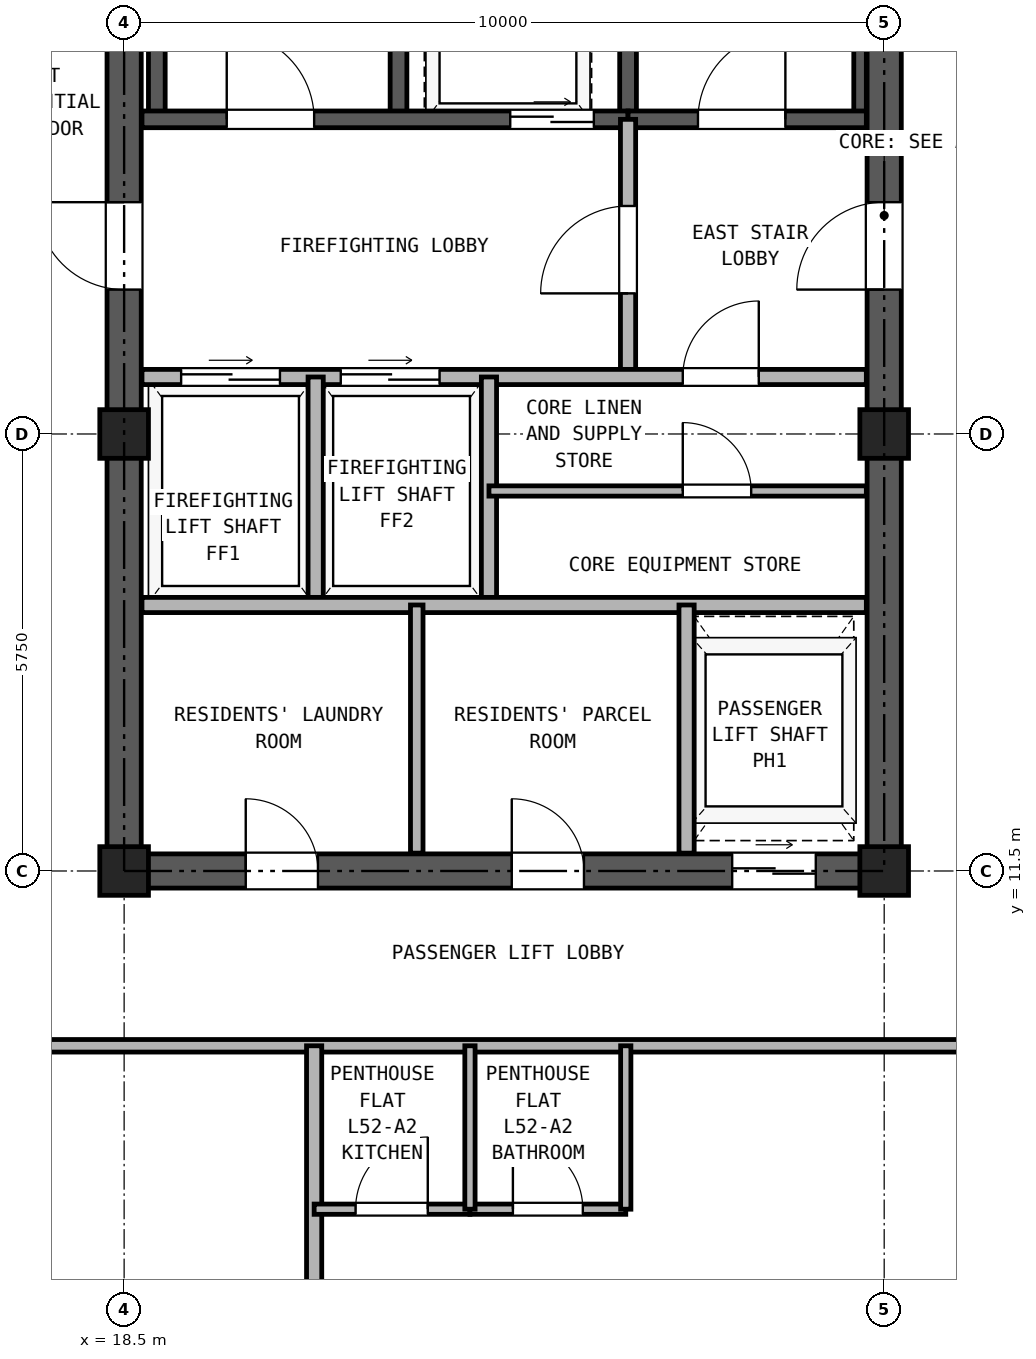
"""IFC4 building model, lengths in metres.
Left out: names, types, materials, properties, quantities, classifications, styles, units other than length and angle.
Written with IfcOpenShell. Run it as: python <this file> out.ifc"""

import sys

from ifc_helpers import new_model, si_unit, direction, frame, frame_2d, origin, origin_2d, place, context, subcontext, project, spatial, rectangle, hollow_rectangle, extrude, source, transform, mapped, element, fill, save


model = new_model("IFC4")
c1 = context("Model", 3, precision=1e-05, world=origin(), true_north=direction((0.0, 1.0)))
c2 = subcontext(c1, "Body", "Model", "MODEL_VIEW")
j1 = project(units=[si_unit("LENGTHUNIT", "METRE"), si_unit("PLANEANGLEUNIT", "RADIAN")], contexts=[c1])
p1 = place(None, origin())
s1 = spatial("IfcSite", under=j1, at=p1, CompositionType="ELEMENT")
p2 = place(p1, origin())
s2 = spatial("IfcBuilding", under=s1, at=p2, CompositionType="ELEMENT")
p3 = place(p2, frame((0.0, 0.0, 184.9)))
s3 = spatial("IfcBuildingStorey", under=s2, at=p3, CompositionType="ELEMENT", Elevation=184.9)
m1 = source(origin(), c2, "Body", "SweptSolid", [
    extrude(hollow_rectangle(XDim=0.64, YDim=0.64, WallThickness=0.035, at=origin_2d()), origin(), (0.0, 0.0, 1.0), 2.84),
])
for number, where, z_axis, x_axis in (
    (1, (18.5, 11.5, 0.0), (0.0, 0.0, 1.0), (1.0, 0.0, 0.0)),
    (2, (18.5, 17.25, 0.0), (0.0, 0.0, 1.0), (1.0, 0.0, 0.0)),
    (3, (28.5, 11.5, 0.0), (0.0, 0.0, 1.0), (1.0, 0.0, 0.0)),
    (4, (28.5, 17.25, 0.0), (0.0, 0.0, 1.0), (1.0, 0.0, 0.0)),
):
    element("IfcColumn", number, at=place(p3, frame(where, z_axis=z_axis, x_axis=x_axis)), inside=s3, PredefinedType="COLUMN", context=c2, shape_type="MappedRepresentation", body=[
        mapped(m1, transform((0.0, 0.0, 0.0), x_axis=(1.0, 0.0, 0.0), y_axis=(0.0, 1.0, 0.0), z_axis=(0.0, 0.0, 1.0), scale=1.0)),
    ])
p4 = place(p3, frame((18.275, 11.5, 0.0), z_axis=(0.0, 0.0, 1.0), x_axis=(1.0, 0.0, 0.0)))
e5 = element("IfcWall", 5, at=p4, inside=s3, PredefinedType="SHEAR", context=c2, shape_type="SweptSolid", body=[
    extrude(rectangle(XDim=10.45, YDim=0.45, at=frame_2d((5.225, 0.0))), origin(), (0.0, 0.0, 1.0), 2.84),
])
p5 = place(p4, frame((1.825, 0.0, 0.0)))
e6 = element("IfcOpeningElement", 6, at=p5, cuts=e5, PredefinedType="OPENING", context=c2, shape_type="SweptSolid", body=[
    extrude(rectangle(XDim=0.95, YDim=2.15, at=frame_2d((0.475, 1.075))), frame((0.0, 0.235, 0.0), z_axis=(0.0, -1.0, 0.0), x_axis=(1.0, 0.0, 0.0)), (0.0, 0.0, 1.0), 0.47),
])
p6 = place(p4, frame((5.325, 0.0, 0.0)))
e7 = element("IfcOpeningElement", 7, at=p6, cuts=e5, PredefinedType="OPENING", context=c2, shape_type="SweptSolid", body=[
    extrude(rectangle(XDim=0.95, YDim=2.15, at=frame_2d((0.475, 1.075))), frame((0.0, 0.235, 0.0), z_axis=(0.0, -1.0, 0.0), x_axis=(1.0, 0.0, 0.0)), (0.0, 0.0, 1.0), 0.47),
])
p7 = place(p4, frame((8.225, 0.0, 0.0)))
e8 = element("IfcOpeningElement", 8, at=p7, cuts=e5, PredefinedType="OPENING", context=c2, shape_type="SweptSolid", body=[
    extrude(rectangle(XDim=1.1, YDim=2.25, at=frame_2d((0.55, 1.125))), frame((0.0, 0.235, 0.0), z_axis=(0.0, -1.0, 0.0), x_axis=(1.0, 0.0, 0.0)), (0.0, 0.0, 1.0), 0.47),
])
p8 = place(p3, frame((18.5, 11.725, 0.0), z_axis=(0.0, 0.0, 1.0), x_axis=(0.0, 1.0, 0.0)))
e9 = element("IfcWall", 9, at=p8, inside=s3, PredefinedType="SHEAR", context=c2, shape_type="SweptSolid", body=[
    extrude(rectangle(XDim=16.8, YDim=0.45, at=frame_2d((8.4, 0.0))), origin(), (0.0, 0.0, 1.0), 2.84),
])
p9 = place(p8, frame((7.425, 0.0, 0.0)))
e10 = element("IfcOpeningElement", 10, at=p9, cuts=e9, PredefinedType="OPENING", context=c2, shape_type="SweptSolid", body=[
    extrude(rectangle(XDim=1.15, YDim=2.2, at=frame_2d((0.575, 1.1))), frame((0.0, 0.235, 0.0), z_axis=(0.0, -1.0, 0.0), x_axis=(1.0, 0.0, 0.0)), (0.0, 0.0, 1.0), 0.47),
])
p10 = place(p3, frame((28.5, 11.725, 0.0), z_axis=(0.0, 0.0, 1.0), x_axis=(0.0, 1.0, 0.0)))
e11 = element("IfcWall", 11, at=p10, inside=s3, PredefinedType="SHEAR", context=c2, shape_type="SweptSolid", body=[
    extrude(rectangle(XDim=16.8, YDim=0.45, at=frame_2d((8.4, 0.0))), origin(), (0.0, 0.0, 1.0), 2.84),
])
p11 = place(p10, frame((7.425, 0.0, 0.0)))
e12 = element("IfcOpeningElement", 12, at=p11, cuts=e11, PredefinedType="OPENING", context=c2, shape_type="SweptSolid", body=[
    extrude(rectangle(XDim=1.15, YDim=2.2, at=frame_2d((0.575, 1.1))), frame((0.0, 0.235, 0.0), z_axis=(0.0, -1.0, 0.0), x_axis=(1.0, 0.0, 0.0)), (0.0, 0.0, 1.0), 0.47),
])
for number, where, z_axis, x_axis in (
    (13, (18.93, 21.39, 0.0), (0.0, 0.0, 1.0), (0.0, 1.0, 0.0)),
    (14, (22.11, 21.39, 0.0), (0.0, 0.0, 1.0), (0.0, 1.0, 0.0)),
    (15, (25.13, 21.39, 0.0), (0.0, 0.0, 1.0), (0.0, 1.0, 0.0)),
):
    element("IfcWall", number, at=place(p3, frame(where, z_axis=z_axis, x_axis=x_axis)), inside=s3, PredefinedType="SOLIDWALL", context=c2, shape_type="SweptSolid", body=[
        extrude(rectangle(XDim=7.11, YDim=0.22, at=frame_2d((3.555, 0.0))), origin(), (0.0, 0.0, 1.0), 2.84),
    ])
p12 = place(p3, frame((28.183, 21.39, 0.0), z_axis=(0.0, 0.0, 1.0), x_axis=(0.0, 1.0, 0.0)))
e16 = element("IfcWall", 16, at=p12, inside=s3, PredefinedType="PARTITIONING", context=c2, shape_type="SweptSolid", body=[
    extrude(rectangle(XDim=6.945, YDim=0.165, at=frame_2d((3.473, 0.0))), origin(), (0.0, 0.0, 1.0), 2.84),
])
p13 = place(p3, frame((18.735, 21.39, 0.0), z_axis=(0.0, 0.0, 1.0), x_axis=(1.0, 0.0, 0.0)))
e17 = element("IfcWall", 17, at=p13, inside=s3, PredefinedType="SOLIDWALL", context=c2, shape_type="SweptSolid", body=[
    extrude(rectangle(XDim=6.395, YDim=0.22, at=frame_2d((3.197, 0.0))), origin(), (0.0, 0.0, 1.0), 2.84),
])
p14 = place(p13, frame((1.115, 0.0, 0.0)))
e18 = element("IfcOpeningElement", 18, at=p14, cuts=e17, PredefinedType="OPENING", context=c2, shape_type="SweptSolid", body=[
    extrude(rectangle(XDim=1.15, YDim=2.2, at=frame_2d((0.575, 1.1))), frame((0.0, 0.12, 0.0), z_axis=(0.0, -1.0, 0.0), x_axis=(1.0, 0.0, 0.0)), (0.0, 0.0, 1.0), 0.24),
])
p15 = place(p13, frame((4.845, 0.0, 0.0)))
e19 = element("IfcOpeningElement", 19, at=p15, cuts=e17, PredefinedType="OPENING", context=c2, shape_type="SweptSolid", body=[
    extrude(rectangle(XDim=1.1, YDim=2.25, at=frame_2d((0.55, 1.125))), frame((0.0, 0.12, 0.0), z_axis=(0.0, -1.0, 0.0), x_axis=(1.0, 0.0, 0.0)), (0.0, 0.0, 1.0), 0.24),
])
p16 = place(p3, frame((25.13, 21.39, 0.0), z_axis=(0.0, 0.0, 1.0), x_axis=(1.0, 0.0, 0.0)))
e20 = element("IfcWall", 20, at=p16, inside=s3, PredefinedType="SOLIDWALL", context=c2, shape_type="SweptSolid", body=[
    extrude(rectangle(XDim=3.135, YDim=0.22, at=frame_2d((1.567, 0.0))), origin(), (0.0, 0.0, 1.0), 2.84),
])
p17 = place(p16, frame((0.92, 0.0, 0.0)))
e21 = element("IfcOpeningElement", 21, at=p17, cuts=e20, PredefinedType="OPENING", context=c2, shape_type="SweptSolid", body=[
    extrude(rectangle(XDim=1.15, YDim=2.2, at=frame_2d((0.575, 1.1))), frame((0.0, 0.12, 0.0), z_axis=(0.0, -1.0, 0.0), x_axis=(1.0, 0.0, 0.0)), (0.0, 0.0, 1.0), 0.24),
])
p18 = place(p3, frame((25.13, 18.0, 0.0), z_axis=(0.0, 0.0, 1.0), x_axis=(0.0, 1.0, 0.0)))
e22 = element("IfcWall", 22, at=p18, inside=s3, PredefinedType="PARTITIONING", context=c2, shape_type="SweptSolid", body=[
    extrude(rectangle(XDim=3.39, YDim=0.2, at=frame_2d((1.695, 0.0))), origin(), (0.0, 0.0, 1.0), 2.84),
])
p19 = place(p18, frame((1.1, 0.0, 0.0)))
e23 = element("IfcOpeningElement", 23, at=p19, cuts=e22, PredefinedType="OPENING", context=c2, shape_type="SweptSolid", body=[
    extrude(rectangle(XDim=1.15, YDim=2.2, at=frame_2d((0.575, 1.1))), frame((0.0, 0.11, 0.0), z_axis=(0.0, -1.0, 0.0), x_axis=(1.0, 0.0, 0.0)), (0.0, 0.0, 1.0), 0.22),
])
p20 = place(p3, frame((18.735, 18.0, 0.0), z_axis=(0.0, 0.0, 1.0), x_axis=(1.0, 0.0, 0.0)))
e24 = element("IfcWall", 24, at=p20, inside=s3, PredefinedType="PARTITIONING", context=c2, shape_type="SweptSolid", body=[
    extrude(rectangle(XDim=9.53, YDim=0.2, at=frame_2d((4.765, 0.0))), origin(), (0.0, 0.0, 1.0), 2.84),
])
p21 = place(p20, frame((0.515, 0.0, 0.0)))
e25 = element("IfcOpeningElement", 25, at=p21, cuts=e24, PredefinedType="OPENING", context=c2, shape_type="SweptSolid", body=[
    extrude(rectangle(XDim=1.3, YDim=2.3, at=frame_2d((0.65, 1.15))), frame((0.0, 0.11, 0.0), z_axis=(0.0, -1.0, 0.0), x_axis=(1.0, 0.0, 0.0)), (0.0, 0.0, 1.0), 0.22),
])
p22 = place(p20, frame((2.615, 0.0, 0.0)))
e26 = element("IfcOpeningElement", 26, at=p22, cuts=e24, PredefinedType="OPENING", context=c2, shape_type="SweptSolid", body=[
    extrude(rectangle(XDim=1.3, YDim=2.3, at=frame_2d((0.65, 1.15))), frame((0.0, 0.11, 0.0), z_axis=(0.0, -1.0, 0.0), x_axis=(1.0, 0.0, 0.0)), (0.0, 0.0, 1.0), 0.22),
])
p23 = place(p20, frame((7.115, 0.0, 0.0)))
e27 = element("IfcOpeningElement", 27, at=p23, cuts=e24, PredefinedType="OPENING", context=c2, shape_type="SweptSolid", body=[
    extrude(rectangle(XDim=1.0, YDim=2.15, at=frame_2d((0.5, 1.075))), frame((0.0, 0.11, 0.0), z_axis=(0.0, -1.0, 0.0), x_axis=(1.0, 0.0, 0.0)), (0.0, 0.0, 1.0), 0.22),
])
for number, where, z_axis, x_axis in (
    (28, (21.02, 15.0, 0.0), (0.0, 0.0, 1.0), (0.0, 1.0, 0.0)),
    (29, (23.3, 15.0, 0.0), (0.0, 0.0, 1.0), (0.0, 1.0, 0.0)),
):
    element("IfcWall", number, at=place(p3, frame(where, z_axis=z_axis, x_axis=x_axis)), inside=s3, PredefinedType="PARTITIONING", context=c2, shape_type="SweptSolid", body=[
        extrude(rectangle(XDim=3.0, YDim=0.2, at=frame_2d((1.5, 0.0))), origin(), (0.0, 0.0, 1.0), 2.84),
    ])
p24 = place(p3, frame((18.735, 15.0, 0.0), z_axis=(0.0, 0.0, 1.0), x_axis=(1.0, 0.0, 0.0)))
e30 = element("IfcWall", 30, at=p24, inside=s3, PredefinedType="PARTITIONING", context=c2, shape_type="SweptSolid", body=[
    extrude(rectangle(XDim=9.53, YDim=0.2, at=frame_2d((4.765, 0.0))), origin(), (0.0, 0.0, 1.0), 2.84),
])
p25 = place(p3, frame((23.3, 16.5, 0.0), z_axis=(0.0, 0.0, 1.0), x_axis=(1.0, 0.0, 0.0)))
e31 = element("IfcWall", 31, at=p25, inside=s3, PredefinedType="PARTITIONING", context=c2, shape_type="SweptSolid", body=[
    extrude(rectangle(XDim=4.965, YDim=0.135, at=frame_2d((2.482, 0.0))), origin(), (0.0, 0.0, 1.0), 2.84),
])
p26 = place(p25, frame((2.55, 0.0, 0.0)))
e32 = element("IfcOpeningElement", 32, at=p26, cuts=e31, PredefinedType="OPENING", context=c2, shape_type="SweptSolid", body=[
    extrude(rectangle(XDim=0.9, YDim=2.05, at=frame_2d((0.45, 1.025))), frame((0.0, 0.077, 0.0), z_axis=(0.0, -1.0, 0.0), x_axis=(1.0, 0.0, 0.0)), (0.0, 0.0, 1.0), 0.155),
])
p27 = place(p3, frame((22.35, 11.735, 0.0), z_axis=(0.0, 0.0, 1.0), x_axis=(0.0, 1.0, 0.0)))
e33 = element("IfcWall", 33, at=p27, inside=s3, PredefinedType="PARTITIONING", context=c2, shape_type="SweptSolid", body=[
    extrude(rectangle(XDim=3.265, YDim=0.165, at=frame_2d((1.632, 0.0))), origin(), (0.0, 0.0, 1.0), 2.84),
])
p28 = place(p3, frame((25.9, 11.735, 0.0), z_axis=(0.0, 0.0, 1.0), x_axis=(0.0, 1.0, 0.0)))
e34 = element("IfcWall", 34, at=p28, inside=s3, PredefinedType="PARTITIONING", context=c2, shape_type="SweptSolid", body=[
    extrude(rectangle(XDim=3.265, YDim=0.2, at=frame_2d((1.632, 0.0))), origin(), (0.0, 0.0, 1.0), 2.84),
])
p29 = place(p3, frame((0.16, 9.2, 0.0), z_axis=(0.0, 0.0, 1.0), x_axis=(1.0, 0.0, 0.0)))
e35 = element("IfcWall", 35, at=p29, inside=s3, PredefinedType="PARTITIONING", context=c2, shape_type="SweptSolid", body=[
    extrude(rectangle(XDim=41.48, YDim=0.165, at=frame_2d((20.74, 0.0))), origin(), (0.0, 0.0, 1.0), 2.84),
])
p30 = place(p29, frame((15.565, 0.0, 0.0)))
e36 = element("IfcOpeningElement", 36, at=p30, cuts=e35, PredefinedType="OPENING", context=c2, shape_type="SweptSolid", body=[
    extrude(rectangle(XDim=1.0, YDim=2.15, at=frame_2d((0.5, 1.075))), frame((0.0, 0.093, 0.0), z_axis=(0.0, -1.0, 0.0), x_axis=(1.0, 0.0, 0.0)), (0.0, 0.0, 1.0), 0.185),
])
p31 = place(p29, frame((30.94, 0.0, 0.0)))
e37 = element("IfcOpeningElement", 37, at=p31, cuts=e35, PredefinedType="OPENING", context=c2, shape_type="SweptSolid", body=[
    extrude(rectangle(XDim=1.0, YDim=2.15, at=frame_2d((0.5, 1.075))), frame((0.0, 0.093, 0.0), z_axis=(0.0, -1.0, 0.0), x_axis=(1.0, 0.0, 0.0)), (0.0, 0.0, 1.0), 0.185),
])
p32 = place(p3, frame((21.0, 0.16, 0.0), z_axis=(0.0, 0.0, 1.0), x_axis=(0.0, 1.0, 0.0)))
e38 = element("IfcWall", 38, at=p32, inside=s3, PredefinedType="PARTITIONING", context=c2, shape_type="SweptSolid", body=[
    extrude(rectangle(XDim=9.04, YDim=0.2, at=frame_2d((4.52, 0.0))), origin(), (0.0, 0.0, 1.0), 2.84),
])
p33 = place(p3, frame((21.0, 7.05, 0.0), z_axis=(0.0, 0.0, 1.0), x_axis=(1.0, 0.0, 0.0)))
e39 = element("IfcWall", 39, at=p33, inside=s3, PredefinedType="PARTITIONING", context=c2, shape_type="SweptSolid", body=[
    extrude(rectangle(XDim=2.05, YDim=0.135, at=frame_2d((1.025, 0.0))), origin(), (0.0, 0.0, 1.0), 2.84),
])
p34 = place(p33, frame((0.545, 0.0, 0.0)))
e40 = element("IfcOpeningElement", 40, at=p34, cuts=e39, PredefinedType="OPENING", context=c2, shape_type="SweptSolid", body=[
    extrude(rectangle(XDim=0.95, YDim=2.15, at=frame_2d((0.475, 1.075))), frame((0.0, 0.077, 0.0), z_axis=(0.0, -1.0, 0.0), x_axis=(1.0, 0.0, 0.0)), (0.0, 0.0, 1.0), 0.155),
])
p35 = place(p3, frame((23.05, 7.05, 0.0), z_axis=(0.0, 0.0, 1.0), x_axis=(1.0, 0.0, 0.0)))
e41 = element("IfcWall", 41, at=p35, inside=s3, PredefinedType="PARTITIONING", context=c2, shape_type="SweptSolid", body=[
    extrude(rectangle(XDim=2.05, YDim=0.135, at=frame_2d((1.025, 0.0))), origin(), (0.0, 0.0, 1.0), 2.84),
])
p36 = place(p35, frame((0.565, 0.0, 0.0)))
e42 = element("IfcOpeningElement", 42, at=p36, cuts=e41, PredefinedType="OPENING", context=c2, shape_type="SweptSolid", body=[
    extrude(rectangle(XDim=0.92, YDim=2.1, at=frame_2d((0.46, 1.05))), frame((0.0, 0.077, 0.0), z_axis=(0.0, -1.0, 0.0), x_axis=(1.0, 0.0, 0.0)), (0.0, 0.0, 1.0), 0.155),
])
for number, where, z_axis, x_axis in (
    (43, (23.05, 7.05, 0.0), (0.0, 0.0, 1.0), (0.0, 1.0, 0.0)),
    (44, (25.1, 7.05, 0.0), (0.0, 0.0, 1.0), (0.0, 1.0, 0.0)),
):
    element("IfcWall", number, at=place(p3, frame(where, z_axis=z_axis, x_axis=x_axis)), inside=s3, PredefinedType="PARTITIONING", context=c2, shape_type="SweptSolid", body=[
        extrude(rectangle(XDim=2.15, YDim=0.135, at=frame_2d((1.075, 0.0))), origin(), (0.0, 0.0, 1.0), 2.84),
    ])
p37 = place(p14, frame((1.15, 0.0, 0.0), z_axis=(0.0, 0.0, 1.0), x_axis=(-1.0, 0.0, 0.0)))
e45 = element("IfcDoor", 45, at=p37, inside=s3, OperationType="SINGLE_SWING_LEFT", PredefinedType="DOOR", context=c2, shape_type="SweptSolid", body=[
    extrude(rectangle(XDim=1.15, YDim=2.2, at=frame_2d((0.575, 1.1))), frame((0.0, 0.025, 0.0), z_axis=(0.0, -1.0, 0.0), x_axis=(1.0, 0.0, 0.0)), (0.0, 0.0, 1.0), 0.05),
])
fill(e18, e45)
p38 = place(p17, frame((1.15, 0.0, 0.0), z_axis=(0.0, 0.0, 1.0), x_axis=(-1.0, 0.0, 0.0)))
e46 = element("IfcDoor", 46, at=p38, inside=s3, OperationType="SINGLE_SWING_RIGHT", PredefinedType="DOOR", context=c2, shape_type="SweptSolid", body=[
    extrude(rectangle(XDim=1.15, YDim=2.2, at=frame_2d((0.575, 1.1))), frame((0.0, 0.025, 0.0), z_axis=(0.0, -1.0, 0.0), x_axis=(1.0, 0.0, 0.0)), (0.0, 0.0, 1.0), 0.05),
])
fill(e21, e46)
p39 = place(p15, frame((1.1, 0.0, 0.0), z_axis=(0.0, 0.0, 1.0), x_axis=(-1.0, 0.0, 0.0)))
e47 = element("IfcDoor", 47, at=p39, inside=s3, OperationType="DOUBLE_DOOR_SLIDING", PredefinedType="DOOR", context=c2, shape_type="SweptSolid", body=[
    extrude(rectangle(XDim=1.1, YDim=2.25, at=frame_2d((0.55, 1.125))), frame((0.0, 0.025, 0.0), z_axis=(0.0, -1.0, 0.0), x_axis=(1.0, 0.0, 0.0)), (0.0, 0.0, 1.0), 0.05),
])
fill(e19, e47)
p40 = place(p19, origin())
e48 = element("IfcDoor", 48, at=p40, inside=s3, OperationType="SINGLE_SWING_LEFT", PredefinedType="DOOR", context=c2, shape_type="SweptSolid", body=[
    extrude(rectangle(XDim=1.15, YDim=2.2, at=frame_2d((0.575, 1.1))), frame((0.0, 0.025, 0.0), z_axis=(0.0, -1.0, 0.0), x_axis=(1.0, 0.0, 0.0)), (0.0, 0.0, 1.0), 0.05),
])
fill(e23, e48)
p41 = place(p21, origin())
e49 = element("IfcDoor", 49, at=p41, inside=s3, OperationType="DOUBLE_DOOR_SLIDING", PredefinedType="DOOR", context=c2, shape_type="SweptSolid", body=[
    extrude(rectangle(XDim=1.3, YDim=2.3, at=frame_2d((0.65, 1.15))), frame((0.0, 0.025, 0.0), z_axis=(0.0, -1.0, 0.0), x_axis=(1.0, 0.0, 0.0)), (0.0, 0.0, 1.0), 0.05),
])
fill(e25, e49)
p42 = place(p22, origin())
e50 = element("IfcDoor", 50, at=p42, inside=s3, OperationType="DOUBLE_DOOR_SLIDING", PredefinedType="DOOR", context=c2, shape_type="SweptSolid", body=[
    extrude(rectangle(XDim=1.3, YDim=2.3, at=frame_2d((0.65, 1.15))), frame((0.0, 0.025, 0.0), z_axis=(0.0, -1.0, 0.0), x_axis=(1.0, 0.0, 0.0)), (0.0, 0.0, 1.0), 0.05),
])
fill(e26, e50)
p43 = place(p23, frame((1.0, 0.0, 0.0), z_axis=(0.0, 0.0, 1.0), x_axis=(-1.0, 0.0, 0.0)))
e51 = element("IfcDoor", 51, at=p43, inside=s3, OperationType="SINGLE_SWING_RIGHT", PredefinedType="DOOR", context=c2, shape_type="SweptSolid", body=[
    extrude(rectangle(XDim=1.0, YDim=2.15, at=frame_2d((0.5, 1.075))), frame((0.0, 0.025, 0.0), z_axis=(0.0, -1.0, 0.0), x_axis=(1.0, 0.0, 0.0)), (0.0, 0.0, 1.0), 0.05),
])
fill(e27, e51)
p44 = place(p26, frame((0.9, 0.0, 0.0), z_axis=(0.0, 0.0, 1.0), x_axis=(-1.0, 0.0, 0.0)))
e52 = element("IfcDoor", 52, at=p44, inside=s3, OperationType="SINGLE_SWING_LEFT", PredefinedType="DOOR", context=c2, shape_type="SweptSolid", body=[
    extrude(rectangle(XDim=0.9, YDim=2.05, at=frame_2d((0.45, 1.025))), frame((0.0, 0.025, 0.0), z_axis=(0.0, -1.0, 0.0), x_axis=(1.0, 0.0, 0.0)), (0.0, 0.0, 1.0), 0.05),
])
fill(e32, e52)
p45 = place(p9, frame((1.15, 0.0, 0.0), z_axis=(0.0, 0.0, 1.0), x_axis=(-1.0, 0.0, 0.0)))
e53 = element("IfcDoor", 53, at=p45, inside=s3, OperationType="SINGLE_SWING_RIGHT", PredefinedType="DOOR", context=c2, shape_type="SweptSolid", body=[
    extrude(rectangle(XDim=1.15, YDim=2.2, at=frame_2d((0.575, 1.1))), frame((0.0, 0.025, 0.0), z_axis=(0.0, -1.0, 0.0), x_axis=(1.0, 0.0, 0.0)), (0.0, 0.0, 1.0), 0.05),
])
fill(e10, e53)
p46 = place(p11, origin())
e54 = element("IfcDoor", 54, at=p46, inside=s3, OperationType="SINGLE_SWING_LEFT", PredefinedType="DOOR", context=c2, shape_type="SweptSolid", body=[
    extrude(rectangle(XDim=1.15, YDim=2.2, at=frame_2d((0.575, 1.1))), frame((0.0, 0.025, 0.0), z_axis=(0.0, -1.0, 0.0), x_axis=(1.0, 0.0, 0.0)), (0.0, 0.0, 1.0), 0.05),
])
fill(e12, e54)
p47 = place(p5, frame((0.95, 0.0, 0.0), z_axis=(0.0, 0.0, 1.0), x_axis=(-1.0, 0.0, 0.0)))
e55 = element("IfcDoor", 55, at=p47, inside=s3, OperationType="SINGLE_SWING_LEFT", PredefinedType="DOOR", context=c2, shape_type="SweptSolid", body=[
    extrude(rectangle(XDim=0.95, YDim=2.15, at=frame_2d((0.475, 1.075))), frame((0.0, 0.025, 0.0), z_axis=(0.0, -1.0, 0.0), x_axis=(1.0, 0.0, 0.0)), (0.0, 0.0, 1.0), 0.05),
])
fill(e6, e55)
p48 = place(p6, frame((0.95, 0.0, 0.0), z_axis=(0.0, 0.0, 1.0), x_axis=(-1.0, 0.0, 0.0)))
e56 = element("IfcDoor", 56, at=p48, inside=s3, OperationType="SINGLE_SWING_LEFT", PredefinedType="DOOR", context=c2, shape_type="SweptSolid", body=[
    extrude(rectangle(XDim=0.95, YDim=2.15, at=frame_2d((0.475, 1.075))), frame((0.0, 0.025, 0.0), z_axis=(0.0, -1.0, 0.0), x_axis=(1.0, 0.0, 0.0)), (0.0, 0.0, 1.0), 0.05),
])
fill(e7, e56)
p49 = place(p7, frame((1.1, 0.0, 0.0), z_axis=(0.0, 0.0, 1.0), x_axis=(-1.0, 0.0, 0.0)))
e57 = element("IfcDoor", 57, at=p49, inside=s3, OperationType="DOUBLE_DOOR_SLIDING", PredefinedType="DOOR", context=c2, shape_type="SweptSolid", body=[
    extrude(rectangle(XDim=1.1, YDim=2.25, at=frame_2d((0.55, 1.125))), frame((0.0, 0.025, 0.0), z_axis=(0.0, -1.0, 0.0), x_axis=(1.0, 0.0, 0.0)), (0.0, 0.0, 1.0), 0.05),
])
fill(e8, e57)
p50 = place(p34, origin())
e58 = element("IfcDoor", 58, at=p50, inside=s3, OperationType="SINGLE_SWING_RIGHT", PredefinedType="DOOR", context=c2, shape_type="SweptSolid", body=[
    extrude(rectangle(XDim=0.95, YDim=2.15, at=frame_2d((0.475, 1.075))), frame((0.0, 0.025, 0.0), z_axis=(0.0, -1.0, 0.0), x_axis=(1.0, 0.0, 0.0)), (0.0, 0.0, 1.0), 0.05),
])
fill(e40, e58)
p51 = place(p36, origin())
e59 = element("IfcDoor", 59, at=p51, inside=s3, OperationType="SINGLE_SWING_LEFT", PredefinedType="DOOR", context=c2, shape_type="SweptSolid", body=[
    extrude(rectangle(XDim=0.92, YDim=2.1, at=frame_2d((0.46, 1.05))), frame((0.0, 0.025, 0.0), z_axis=(0.0, -1.0, 0.0), x_axis=(1.0, 0.0, 0.0)), (0.0, 0.0, 1.0), 0.05),
])
fill(e42, e59)
save(model, sys.argv[1])
